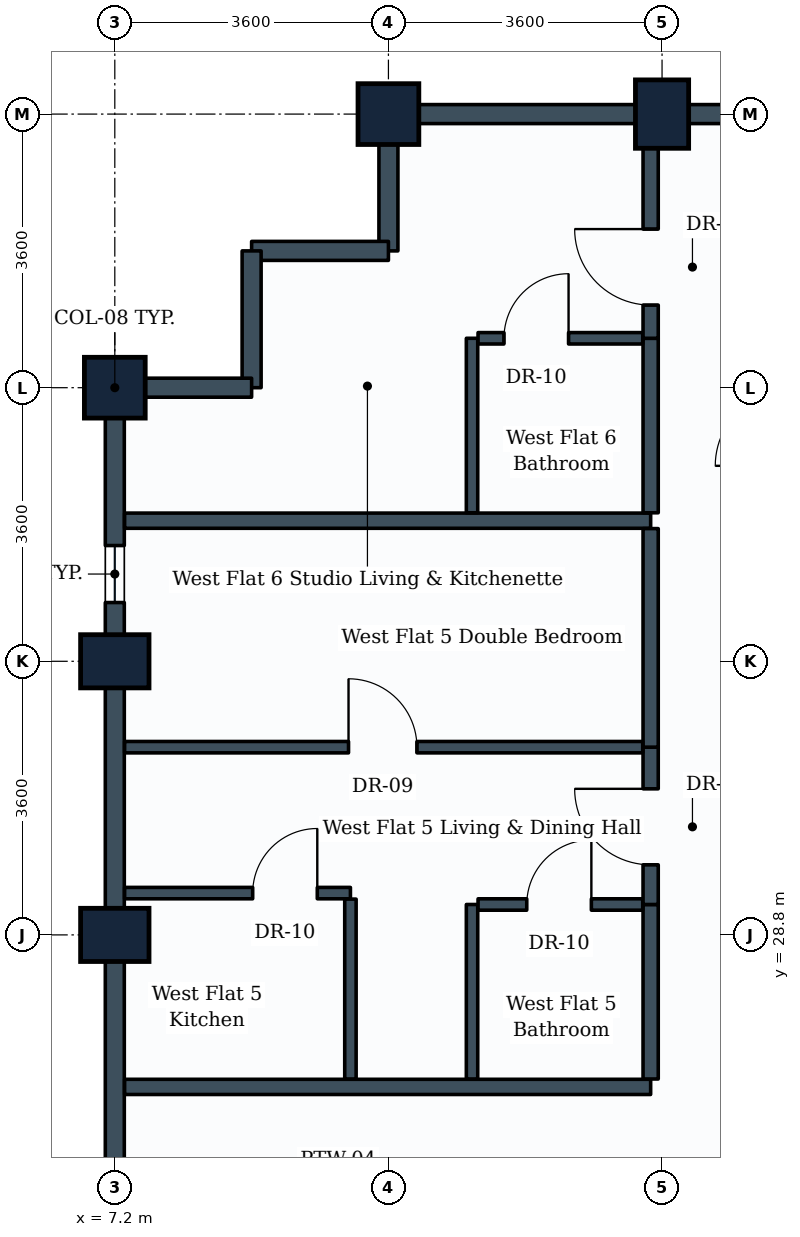
"""IFC4 building model, lengths in metres.
Left out: names, types, materials, properties, quantities, classifications, styles, units other than length and angle.
Written with IfcOpenShell. Run it as: python <this file> out.ifc"""

import sys

from ifc_helpers import new_model, si_unit, direction, frame, frame_2d, origin, origin_2d, place, context, subcontext, project, spatial, rectangle, extrude, element, fill, save


model = new_model("IFC4")
c1 = context("Model", 3, precision=1e-05, world=origin(), true_north=direction((0.0, 1.0)))
c2 = subcontext(c1, "Body", "Model", "MODEL_VIEW")
j1 = project(units=[si_unit("LENGTHUNIT", "METRE"), si_unit("PLANEANGLEUNIT", "RADIAN")], contexts=[c1])
p1 = place(None, origin())
s1 = spatial("IfcSite", under=j1, at=p1, CompositionType="ELEMENT")
p2 = place(p1, origin())
s2 = spatial("IfcBuilding", under=s1, at=p2, CompositionType="ELEMENT")
p3 = place(p2, frame((0.0, 0.0, 178.6)))
s3 = spatial("IfcBuildingStorey", under=s2, at=p3, CompositionType="ELEMENT", Elevation=178.6)
for number, where, z_axis, x_axis in (
    (1, (7.2, 28.8, 0.0), (0.0, 0.0, 1.0), (0.0, 1.0, 0.0)),
    (2, (7.2, 32.4, 0.0), (0.0, 0.0, 1.0), (0.0, 1.0, 0.0)),
):
    element("IfcColumn", number, at=place(p3, frame(where, z_axis=z_axis, x_axis=x_axis)), inside=s3, PredefinedType="COLUMN", context=c2, shape_type="SweptSolid", body=[
        extrude(rectangle(XDim=0.7, YDim=0.9, at=origin_2d()), origin(), (0.0, 0.0, 1.0), 3.8),
    ])
for number, where, z_axis, x_axis in (
    (3, (7.2, 36.0, 0.0), (0.0, 0.0, 1.0), (0.0, 1.0, 0.0)),
    (4, (10.8, 39.6, 0.0), (0.0, 0.0, 1.0), (1.0, 0.0, 0.0)),
):
    element("IfcColumn", number, at=place(p3, frame(where, z_axis=z_axis, x_axis=x_axis)), inside=s3, PredefinedType="COLUMN", context=c2, shape_type="SweptSolid", body=[
        extrude(rectangle(XDim=0.8, YDim=0.8, at=origin_2d()), origin(), (0.0, 0.0, 1.0), 3.8),
    ])
p4 = place(p3, frame((14.4, 39.6, 0.0), z_axis=(0.0, 0.0, 1.0), x_axis=(1.0, 0.0, 0.0)))
e5 = element("IfcColumn", 5, at=p4, inside=s3, PredefinedType="COLUMN", context=c2, shape_type="SweptSolid", body=[
    extrude(rectangle(XDim=0.7, YDim=0.9, at=origin_2d()), origin(), (0.0, 0.0, 1.0), 3.8),
])
p5 = place(p3, frame((14.4, 39.6, 0.0), z_axis=(0.0, 0.0, 1.0), x_axis=(1.0, 0.0, 0.0)))
e6 = element("IfcWall", 6, at=p5, inside=s3, PredefinedType="STANDARD", context=c2, shape_type="SweptSolid", body=[
    extrude(rectangle(XDim=3.6, YDim=0.25, at=frame_2d((1.8, 0.0))), origin(), (0.0, 0.0, 1.0), 2.93),
])
p6 = place(p3, frame((10.8, 39.6, 0.0), z_axis=(0.0, 0.0, 1.0), x_axis=(1.0, 0.0, 0.0)))
e7 = element("IfcWall", 7, at=p6, inside=s3, PredefinedType="STANDARD", context=c2, shape_type="SweptSolid", body=[
    extrude(rectangle(XDim=3.6, YDim=0.25, at=frame_2d((1.8, 0.0))), origin(), (0.0, 0.0, 1.0), 2.93),
])
p7 = place(p3, frame((10.8, 37.8, 0.0), z_axis=(0.0, 0.0, 1.0), x_axis=(0.0, 1.0, 0.0)))
e8 = element("IfcWall", 8, at=p7, inside=s3, PredefinedType="STANDARD", context=c2, shape_type="SweptSolid", body=[
    extrude(rectangle(XDim=1.8, YDim=0.25, at=frame_2d((0.9, 0.0))), origin(), (0.0, 0.0, 1.0), 2.93),
])
for number, where, z_axis, x_axis in (
    (9, (9.0, 37.8, 0.0), (0.0, 0.0, 1.0), (1.0, 0.0, 0.0)),
    (10, (9.0, 36.0, 0.0), (0.0, 0.0, 1.0), (0.0, 1.0, 0.0)),
):
    element("IfcWall", number, at=place(p3, frame(where, z_axis=z_axis, x_axis=x_axis)), inside=s3, PredefinedType="STANDARD", context=c2, shape_type="SweptSolid", body=[
        extrude(rectangle(XDim=1.8, YDim=0.25, at=frame_2d((0.9, 0.0))), origin(), (0.0, 0.0, 1.0), 3.535),
    ])
p8 = place(p3, frame((7.2, 36.0, 0.0), z_axis=(0.0, 0.0, 1.0), x_axis=(1.0, 0.0, 0.0)))
e11 = element("IfcWall", 11, at=p8, inside=s3, PredefinedType="STANDARD", context=c2, shape_type="SweptSolid", body=[
    extrude(rectangle(XDim=1.8, YDim=0.25, at=frame_2d((0.9, 0.0))), origin(), (0.0, 0.0, 1.0), 2.93),
])
p9 = place(p3, frame((7.2, 32.4, 0.0), z_axis=(0.0, 0.0, 1.0), x_axis=(0.0, 1.0, 0.0)))
e12 = element("IfcWall", 12, at=p9, inside=s3, PredefinedType="STANDARD", context=c2, shape_type="SweptSolid", body=[
    extrude(rectangle(XDim=3.6, YDim=0.25, at=frame_2d((1.8, 0.0))), origin(), (0.0, 0.0, 1.0), 2.93),
])
p10 = place(p9, frame((0.773, 0.0, 0.85)))
e13 = element("IfcOpeningElement", 13, at=p10, cuts=e12, PredefinedType="OPENING", context=c2, shape_type="SweptSolid", body=[
    extrude(rectangle(XDim=0.75, YDim=1.05, at=frame_2d((0.375, 0.525))), frame((0.0, 0.135, 0.0), z_axis=(0.0, -1.0, 0.0), x_axis=(1.0, 0.0, 0.0)), (0.0, 0.0, 1.0), 0.27),
])
p11 = place(p3, frame((7.2, 28.8, 0.0), z_axis=(0.0, 0.0, 1.0), x_axis=(0.0, 1.0, 0.0)))
e14 = element("IfcWall", 14, at=p11, inside=s3, PredefinedType="STANDARD", context=c2, shape_type="SweptSolid", body=[
    extrude(rectangle(XDim=3.6, YDim=0.25, at=frame_2d((1.8, 0.0))), origin(), (0.0, 0.0, 1.0), 2.93),
])
p12 = place(p3, frame((7.2, 25.2, 0.0), z_axis=(0.0, 0.0, 1.0), x_axis=(0.0, 1.0, 0.0)))
e15 = element("IfcWall", 15, at=p12, inside=s3, PredefinedType="STANDARD", context=c2, shape_type="SweptSolid", body=[
    extrude(rectangle(XDim=3.6, YDim=0.25, at=frame_2d((1.8, 0.0))), origin(), (0.0, 0.0, 1.0), 2.93),
])
for number, where, z_axis, x_axis in (
    (16, (7.329, 26.8, 0.0), (0.0, 0.0, 1.0), (1.0, 0.0, 0.0)),
    (17, (7.329, 34.25, 0.0), (0.0, 0.0, 1.0), (1.0, 0.0, 0.0)),
):
    element("IfcWall", number, at=place(p3, frame(where, z_axis=z_axis, x_axis=x_axis)), inside=s3, PredefinedType="PARTITIONING", context=c2, shape_type="SweptSolid", body=[
        extrude(rectangle(XDim=6.921, YDim=0.2, at=frame_2d((3.46, 0.0))), origin(), (0.0, 0.0, 1.0), 2.93),
    ])
p13 = place(p3, frame((14.25, 26.904, 0.0), z_axis=(0.0, 0.0, 1.0), x_axis=(0.0, 1.0, 0.0)))
e18 = element("IfcWall", 18, at=p13, inside=s3, PredefinedType="PARTITIONING", context=c2, shape_type="SweptSolid", body=[
    extrude(rectangle(XDim=2.296, YDim=0.2, at=frame_2d((1.148, 0.0))), origin(), (0.0, 0.0, 1.0), 3.17),
])
p14 = place(p3, frame((11.9, 26.904, 0.0), z_axis=(0.0, 0.0, 1.0), x_axis=(0.0, 1.0, 0.0)))
e19 = element("IfcWall", 19, at=p14, inside=s3, PredefinedType="PARTITIONING", context=c2, shape_type="SweptSolid", body=[
    extrude(rectangle(XDim=2.296, YDim=0.15, at=frame_2d((1.148, 0.0))), origin(), (0.0, 0.0, 1.0), 3.22),
])
p15 = place(p3, frame((11.979, 29.2, 0.0), z_axis=(0.0, 0.0, 1.0), x_axis=(1.0, 0.0, 0.0)))
e20 = element("IfcWall", 20, at=p15, inside=s3, PredefinedType="PARTITIONING", context=c2, shape_type="SweptSolid", body=[
    extrude(rectangle(XDim=2.167, YDim=0.15, at=frame_2d((1.083, 0.0))), origin(), (0.0, 0.0, 1.0), 3.535),
])
p16 = place(p15, frame((0.641, 0.0, 0.0)))
e21 = element("IfcOpeningElement", 21, at=p16, cuts=e20, PredefinedType="OPENING", context=c2, shape_type="SweptSolid", body=[
    extrude(rectangle(XDim=0.85, YDim=2.1, at=frame_2d((0.425, 1.05))), frame((0.0, 0.085, 0.0), z_axis=(0.0, -1.0, 0.0), x_axis=(1.0, 0.0, 0.0)), (0.0, 0.0, 1.0), 0.17),
])
p17 = place(p3, frame((14.25, 29.2, 0.0), z_axis=(0.0, 0.0, 1.0), x_axis=(0.0, 1.0, 0.0)))
e22 = element("IfcWall", 22, at=p17, inside=s3, PredefinedType="PARTITIONING", context=c2, shape_type="SweptSolid", body=[
    extrude(rectangle(XDim=2.07, YDim=0.2, at=frame_2d((1.035, 0.0))), origin(), (0.0, 0.0, 1.0), 3.17),
])
p18 = place(p17, frame((0.522, 0.0, 0.0)))
e23 = element("IfcOpeningElement", 23, at=p18, cuts=e22, PredefinedType="OPENING", context=c2, shape_type="SweptSolid", body=[
    extrude(rectangle(XDim=1.0, YDim=2.1, at=frame_2d((0.5, 1.05))), frame((0.0, 0.11, 0.0), z_axis=(0.0, -1.0, 0.0), x_axis=(1.0, 0.0, 0.0)), (0.0, 0.0, 1.0), 0.22),
])
p19 = place(p3, frame((14.25, 31.27, 0.0), z_axis=(0.0, 0.0, 1.0), x_axis=(0.0, 1.0, 0.0)))
e24 = element("IfcWall", 24, at=p19, inside=s3, PredefinedType="PARTITIONING", context=c2, shape_type="SweptSolid", body=[
    extrude(rectangle(XDim=2.876, YDim=0.2, at=frame_2d((1.438, 0.0))), origin(), (0.0, 0.0, 1.0), 3.17),
])
p20 = place(p3, frame((7.329, 31.27, 0.0), z_axis=(0.0, 0.0, 1.0), x_axis=(1.0, 0.0, 0.0)))
e25 = element("IfcWall", 25, at=p20, inside=s3, PredefinedType="PARTITIONING", context=c2, shape_type="SweptSolid", body=[
    extrude(rectangle(XDim=6.817, YDim=0.15, at=frame_2d((3.408, 0.0))), origin(), (0.0, 0.0, 1.0), 2.93),
])
p21 = place(p20, frame((2.946, 0.0, 0.0)))
e26 = element("IfcOpeningElement", 26, at=p21, cuts=e25, PredefinedType="OPENING", context=c2, shape_type="SweptSolid", body=[
    extrude(rectangle(XDim=0.9, YDim=2.1, at=frame_2d((0.45, 1.05))), frame((0.0, 0.085, 0.0), z_axis=(0.0, -1.0, 0.0), x_axis=(1.0, 0.0, 0.0)), (0.0, 0.0, 1.0), 0.17),
])
p22 = place(p3, frame((7.329, 29.35, 0.0), z_axis=(0.0, 0.0, 1.0), x_axis=(1.0, 0.0, 0.0)))
e27 = element("IfcWall", 27, at=p22, inside=s3, PredefinedType="PARTITIONING", context=c2, shape_type="SweptSolid", body=[
    extrude(rectangle(XDim=2.971, YDim=0.15, at=frame_2d((1.485, 0.0))), origin(), (0.0, 0.0, 1.0), 2.93),
])
p23 = place(p22, frame((1.685, 0.0, 0.0)))
e28 = element("IfcOpeningElement", 28, at=p23, cuts=e27, PredefinedType="OPENING", context=c2, shape_type="SweptSolid", body=[
    extrude(rectangle(XDim=0.85, YDim=2.1, at=frame_2d((0.425, 1.05))), frame((0.0, 0.085, 0.0), z_axis=(0.0, -1.0, 0.0), x_axis=(1.0, 0.0, 0.0)), (0.0, 0.0, 1.0), 0.17),
])
p24 = place(p3, frame((10.3, 26.904, 0.0), z_axis=(0.0, 0.0, 1.0), x_axis=(0.0, 1.0, 0.0)))
e29 = element("IfcWall", 29, at=p24, inside=s3, PredefinedType="PARTITIONING", context=c2, shape_type="SweptSolid", body=[
    extrude(rectangle(XDim=2.367, YDim=0.15, at=frame_2d((1.184, 0.0))), origin(), (0.0, 0.0, 1.0), 3.22),
])
p25 = place(p3, frame((14.25, 34.354, 0.0), z_axis=(0.0, 0.0, 1.0), x_axis=(0.0, 1.0, 0.0)))
e30 = element("IfcWall", 30, at=p25, inside=s3, PredefinedType="PARTITIONING", context=c2, shape_type="SweptSolid", body=[
    extrude(rectangle(XDim=2.296, YDim=0.2, at=frame_2d((1.148, 0.0))), origin(), (0.0, 0.0, 1.0), 3.535),
])
p26 = place(p3, frame((11.9, 34.354, 0.0), z_axis=(0.0, 0.0, 1.0), x_axis=(0.0, 1.0, 0.0)))
e31 = element("IfcWall", 31, at=p26, inside=s3, PredefinedType="PARTITIONING", context=c2, shape_type="SweptSolid", body=[
    extrude(rectangle(XDim=2.296, YDim=0.15, at=frame_2d((1.148, 0.0))), origin(), (0.0, 0.0, 1.0), 3.535),
])
p27 = place(p3, frame((11.979, 36.65, 0.0), z_axis=(0.0, 0.0, 1.0), x_axis=(1.0, 0.0, 0.0)))
e32 = element("IfcWall", 32, at=p27, inside=s3, PredefinedType="PARTITIONING", context=c2, shape_type="SweptSolid", body=[
    extrude(rectangle(XDim=2.167, YDim=0.15, at=frame_2d((1.083, 0.0))), origin(), (0.0, 0.0, 1.0), 3.535),
])
p28 = place(p27, frame((0.341, 0.0, 0.0)))
e33 = element("IfcOpeningElement", 33, at=p28, cuts=e32, PredefinedType="OPENING", context=c2, shape_type="SweptSolid", body=[
    extrude(rectangle(XDim=0.85, YDim=2.1, at=frame_2d((0.425, 1.05))), frame((0.0, 0.085, 0.0), z_axis=(0.0, -1.0, 0.0), x_axis=(1.0, 0.0, 0.0)), (0.0, 0.0, 1.0), 0.17),
])
p29 = place(p3, frame((14.25, 36.65, 0.0), z_axis=(0.0, 0.0, 1.0), x_axis=(0.0, 1.0, 0.0)))
e34 = element("IfcWall", 34, at=p29, inside=s3, PredefinedType="PARTITIONING", context=c2, shape_type="SweptSolid", body=[
    extrude(rectangle(XDim=2.821, YDim=0.2, at=frame_2d((1.411, 0.0))), origin(), (0.0, 0.0, 1.0), 2.93),
])
p30 = place(p29, frame((0.437, 0.0, 0.0)))
e35 = element("IfcOpeningElement", 35, at=p30, cuts=e34, PredefinedType="OPENING", context=c2, shape_type="SweptSolid", body=[
    extrude(rectangle(XDim=1.0, YDim=2.1, at=frame_2d((0.5, 1.05))), frame((0.0, 0.11, 0.0), z_axis=(0.0, -1.0, 0.0), x_axis=(1.0, 0.0, 0.0)), (0.0, 0.0, 1.0), 0.22),
])
p31 = place(p16, origin())
e36 = element("IfcDoor", 36, at=p31, inside=s3, OperationType="SINGLE_SWING_RIGHT", PredefinedType="DOOR", context=c2, shape_type="SweptSolid", body=[
    extrude(rectangle(XDim=0.85, YDim=2.1, at=frame_2d((0.425, 1.05))), frame((0.0, 0.025, 0.0), z_axis=(0.0, -1.0, 0.0), x_axis=(1.0, 0.0, 0.0)), (0.0, 0.0, 1.0), 0.05),
])
fill(e21, e36)
p32 = place(p18, origin())
e37 = element("IfcDoor", 37, at=p32, inside=s3, OperationType="SINGLE_SWING_RIGHT", PredefinedType="DOOR", context=c2, shape_type="SweptSolid", body=[
    extrude(rectangle(XDim=1.0, YDim=2.1, at=frame_2d((0.5, 1.05))), frame((0.0, 0.025, 0.0), z_axis=(0.0, -1.0, 0.0), x_axis=(1.0, 0.0, 0.0)), (0.0, 0.0, 1.0), 0.05),
])
fill(e23, e37)
p33 = place(p21, origin())
e38 = element("IfcDoor", 38, at=p33, inside=s3, OperationType="SINGLE_SWING_LEFT", PredefinedType="DOOR", context=c2, shape_type="SweptSolid", body=[
    extrude(rectangle(XDim=0.9, YDim=2.1, at=frame_2d((0.45, 1.05))), frame((0.0, 0.025, 0.0), z_axis=(0.0, -1.0, 0.0), x_axis=(1.0, 0.0, 0.0)), (0.0, 0.0, 1.0), 0.05),
])
fill(e26, e38)
p34 = place(p23, origin())
e39 = element("IfcDoor", 39, at=p34, inside=s3, OperationType="SINGLE_SWING_RIGHT", PredefinedType="DOOR", context=c2, shape_type="SweptSolid", body=[
    extrude(rectangle(XDim=0.85, YDim=2.1, at=frame_2d((0.425, 1.05))), frame((0.0, 0.025, 0.0), z_axis=(0.0, -1.0, 0.0), x_axis=(1.0, 0.0, 0.0)), (0.0, 0.0, 1.0), 0.05),
])
fill(e28, e39)
p35 = place(p28, origin())
e40 = element("IfcDoor", 40, at=p35, inside=s3, OperationType="SINGLE_SWING_RIGHT", PredefinedType="DOOR", context=c2, shape_type="SweptSolid", body=[
    extrude(rectangle(XDim=0.85, YDim=2.1, at=frame_2d((0.425, 1.05))), frame((0.0, 0.025, 0.0), z_axis=(0.0, -1.0, 0.0), x_axis=(1.0, 0.0, 0.0)), (0.0, 0.0, 1.0), 0.05),
])
fill(e33, e40)
p36 = place(p30, origin())
e41 = element("IfcDoor", 41, at=p36, inside=s3, OperationType="SINGLE_SWING_RIGHT", PredefinedType="DOOR", context=c2, shape_type="SweptSolid", body=[
    extrude(rectangle(XDim=1.0, YDim=2.1, at=frame_2d((0.5, 1.05))), frame((0.0, 0.025, 0.0), z_axis=(0.0, -1.0, 0.0), x_axis=(1.0, 0.0, 0.0)), (0.0, 0.0, 1.0), 0.05),
])
fill(e35, e41)
p37 = place(p10, origin())
e42 = element("IfcWindow", 42, at=p37, inside=s3, PartitioningType="SINGLE_PANEL", PredefinedType="WINDOW", context=c2, shape_type="SweptSolid", body=[
    extrude(rectangle(XDim=0.75, YDim=1.05, at=frame_2d((0.375, 0.525))), frame((0.0, 0.03, 0.0), z_axis=(0.0, -1.0, 0.0), x_axis=(1.0, 0.0, 0.0)), (0.0, 0.0, 1.0), 0.06),
])
fill(e13, e42)
save(model, sys.argv[1])
